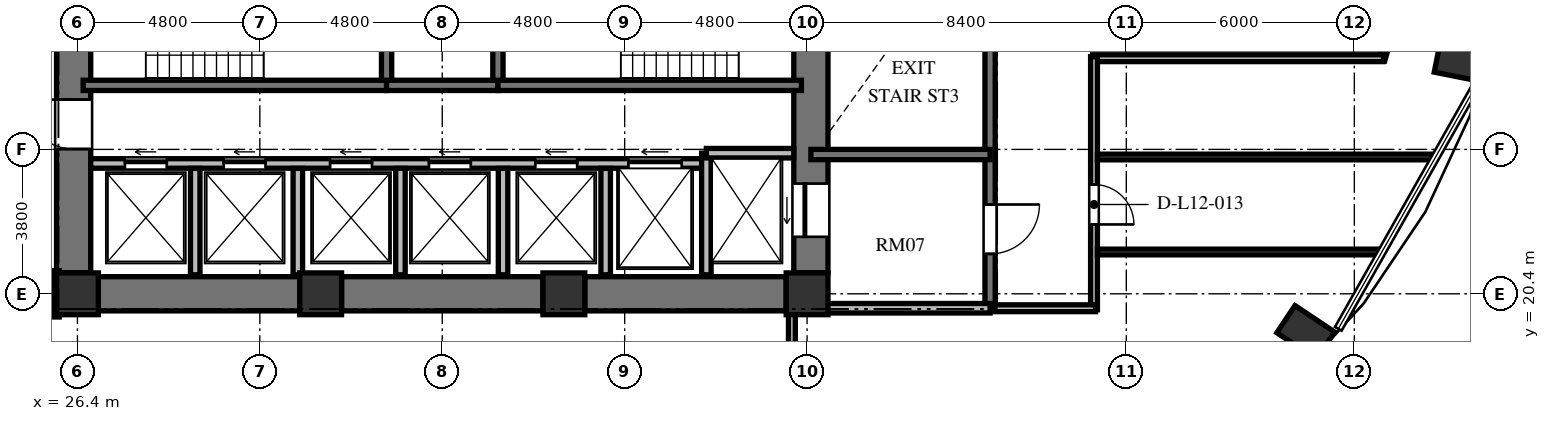
"""IFC4 building model, lengths in metres.
Left out: names, types, materials, properties, quantities, classifications, styles, units other than length and angle.
Written with IfcOpenShell. Run it as: python <this file> out.ifc"""

import sys

from ifc_helpers import new_model, si_unit, direction, frame, frame_2d, origin, origin_2d, place, context, subcontext, project, spatial, rectangle, extrude, element, fill, save


model = new_model("IFC4")
c1 = context("Model", 3, precision=1e-05, world=origin(), true_north=direction((0.0, 1.0)))
c2 = subcontext(c1, "Body", "Model", "MODEL_VIEW")
j1 = project(units=[si_unit("LENGTHUNIT", "METRE"), si_unit("PLANEANGLEUNIT", "RADIAN")], contexts=[c1])
p1 = place(None, origin())
s1 = spatial("IfcSite", under=j1, at=p1, CompositionType="ELEMENT")
p2 = place(p1, origin())
s2 = spatial("IfcBuilding", under=s1, at=p2, CompositionType="ELEMENT")
p3 = place(p2, frame((0.0, 0.0, 50.736)))
s3 = spatial("IfcBuildingStorey", under=s2, at=p3, CompositionType="ELEMENT", Elevation=50.736)
for number, where, z_axis, x_axis in (
    (1, (58.72, 19.386, 0.0), (0.0, 0.0, 1.0), (0.831, -0.556, 0.0)),
    (2, (62.8, 26.532, 0.0), (0.0, 0.0, 1.0), (0.981, -0.195, 0.0)),
):
    element("IfcColumn", number, at=place(p3, frame(where, z_axis=z_axis, x_axis=x_axis)), inside=s3, PredefinedType="COLUMN", context=c2, shape_type="SweptSolid", body=[
        extrude(rectangle(XDim=1.25, YDim=0.86, at=origin_2d()), origin(), (0.0, 0.0, 1.0), 3.648),
    ])
for number, where, z_axis, x_axis in (
    (3, (26.4, 20.4, 0.0), (0.0, 0.0, 1.0), (1.0, 0.0, 0.0)),
    (4, (32.8, 20.4, 0.0), (0.0, 0.0, 1.0), (1.0, 0.0, 0.0)),
    (5, (39.2, 20.4, 0.0), (0.0, 0.0, 1.0), (1.0, 0.0, 0.0)),
    (6, (45.6, 20.4, 0.0), (0.0, 0.0, 1.0), (1.0, 0.0, 0.0)),
):
    element("IfcColumn", number, at=place(p3, frame(where, z_axis=z_axis, x_axis=x_axis)), inside=s3, PredefinedType="COLUMN", context=c2, shape_type="SweptSolid", body=[
        extrude(rectangle(XDim=1.1, YDim=1.1, at=origin_2d()), origin(), (0.0, 0.0, 1.0), 3.648),
    ])
p4 = place(p3, frame((26.3, 20.95, 0.0), z_axis=(0.0, 0.0, 1.0), x_axis=(0.0, 1.0, 0.0)))
e7 = element("IfcWall", 7, at=p4, inside=s3, PredefinedType="SHEAR", context=c2, shape_type="SweptSolid", body=[
    extrude(rectangle(XDim=14.1, YDim=0.9, at=frame_2d((7.05, 0.0))), origin(), (0.0, 0.0, 1.0), 3.648),
])
p5 = place(p4, frame((6.5, 0.0, 0.0)))
e8 = element("IfcOpeningElement", 8, at=p5, cuts=e7, PredefinedType="OPENING", context=c2, shape_type="SweptSolid", body=[
    extrude(rectangle(XDim=1.2, YDim=2.15, at=frame_2d((0.6, 1.075))), frame((0.0, 0.46, 0.0), z_axis=(0.0, -1.0, 0.0), x_axis=(1.0, 0.0, 0.0)), (0.0, 0.0, 1.0), 0.92),
])
p6 = place(p4, frame((9.6, 0.0, 0.0)))
e9 = element("IfcOpeningElement", 9, at=p6, cuts=e7, PredefinedType="OPENING", context=c2, shape_type="SweptSolid", body=[
    extrude(rectangle(XDim=1.3, YDim=2.2, at=frame_2d((0.65, 1.1))), frame((0.0, 0.46, 0.0), z_axis=(0.0, -1.0, 0.0), x_axis=(1.0, 0.0, 0.0)), (0.0, 0.0, 1.0), 0.92),
])
p7 = place(p4, frame((3.26, 0.0, 0.0)))
e10 = element("IfcOpeningElement", 10, at=p7, cuts=e7, PredefinedType="OPENING", context=c2, shape_type="SweptSolid", body=[
    extrude(rectangle(XDim=1.3, YDim=2.2, at=frame_2d((0.65, 1.1))), frame((0.0, 0.46, 0.0), z_axis=(0.0, -1.0, 0.0), x_axis=(1.0, 0.0, 0.0)), (0.0, 0.0, 1.0), 0.92),
])
p8 = place(p3, frame((45.7, 20.95, 0.0), z_axis=(0.0, 0.0, 1.0), x_axis=(0.0, 1.0, 0.0)))
e11 = element("IfcWall", 11, at=p8, inside=s3, PredefinedType="SHEAR", context=c2, shape_type="SweptSolid", body=[
    extrude(rectangle(XDim=14.1, YDim=0.9, at=frame_2d((7.05, 0.0))), origin(), (0.0, 0.0, 1.0), 3.648),
])
p9 = place(p8, frame((11.75, 0.0, 0.0)))
e12 = element("IfcOpeningElement", 12, at=p9, cuts=e11, PredefinedType="OPENING", context=c2, shape_type="SweptSolid", body=[
    extrude(rectangle(XDim=1.4, YDim=2.3, at=frame_2d((0.7, 1.15))), frame((0.0, 0.46, 0.0), z_axis=(0.0, -1.0, 0.0), x_axis=(1.0, 0.0, 0.0)), (0.0, 0.0, 1.0), 0.92),
])
p10 = place(p8, frame((0.95, 0.0, 0.0)))
e13 = element("IfcOpeningElement", 13, at=p10, cuts=e11, PredefinedType="OPENING", context=c2, shape_type="SweptSolid", body=[
    extrude(rectangle(XDim=1.4, YDim=2.3, at=frame_2d((0.7, 1.15))), frame((0.0, 0.46, 0.0), z_axis=(0.0, -1.0, 0.0), x_axis=(1.0, 0.0, 0.0)), (0.0, 0.0, 1.0), 0.92),
])
p11 = place(p3, frame((26.95, 20.4, 0.0), z_axis=(0.0, 0.0, 1.0), x_axis=(1.0, 0.0, 0.0)))
e14 = element("IfcWall", 14, at=p11, inside=s3, PredefinedType="SHEAR", context=c2, shape_type="SweptSolid", body=[
    extrude(rectangle(XDim=5.3, YDim=0.9, at=frame_2d((2.65, 0.0))), origin(), (0.0, 0.0, 1.0), 3.648),
])
p12 = place(p3, frame((33.35, 20.4, 0.0), z_axis=(0.0, 0.0, 1.0), x_axis=(1.0, 0.0, 0.0)))
e15 = element("IfcWall", 15, at=p12, inside=s3, PredefinedType="SHEAR", context=c2, shape_type="SweptSolid", body=[
    extrude(rectangle(XDim=5.3, YDim=0.9, at=frame_2d((2.65, 0.0))), origin(), (0.0, 0.0, 1.0), 3.648),
])
p13 = place(p3, frame((39.75, 20.4, 0.0), z_axis=(0.0, 0.0, 1.0), x_axis=(1.0, 0.0, 0.0)))
e16 = element("IfcWall", 16, at=p13, inside=s3, PredefinedType="SHEAR", context=c2, shape_type="SweptSolid", body=[
    extrude(rectangle(XDim=5.3, YDim=0.9, at=frame_2d((2.65, 0.0))), origin(), (0.0, 0.0, 1.0), 3.648),
])
p14 = place(p3, frame((26.55, 25.885, 0.0), z_axis=(0.0, 0.0, 1.0), x_axis=(1.0, 0.0, 0.0)))
e17 = element("IfcWall", 17, at=p14, inside=s3, PredefinedType="SHEAR", context=c2, shape_type="SweptSolid", body=[
    extrude(rectangle(XDim=7.985, YDim=0.27, at=frame_2d((3.992, 0.0))), origin(), (0.0, 0.0, 1.0), 3.648),
])
p15 = place(p3, frame((34.535, 25.885, 0.0), z_axis=(0.0, 0.0, 1.0), x_axis=(1.0, 0.0, 0.0)))
e18 = element("IfcWall", 18, at=p15, inside=s3, PredefinedType="SHEAR", context=c2, shape_type="SweptSolid", body=[
    extrude(rectangle(XDim=2.93, YDim=0.27, at=frame_2d((1.465, 0.0))), origin(), (0.0, 0.0, 1.0), 3.648),
])
p16 = place(p3, frame((37.465, 25.885, 0.0), z_axis=(0.0, 0.0, 1.0), x_axis=(1.0, 0.0, 0.0)))
e19 = element("IfcWall", 19, at=p16, inside=s3, PredefinedType="SHEAR", context=c2, shape_type="SweptSolid", body=[
    extrude(rectangle(XDim=7.985, YDim=0.27, at=frame_2d((3.992, 0.0))), origin(), (0.0, 0.0, 1.0), 3.648),
])
for number, where, z_axis, x_axis in (
    (20, (34.535, 26.02, 0.0), (0.0, 0.0, 1.0), (0.0, 1.0, 0.0)),
    (21, (37.465, 26.02, 0.0), (0.0, 0.0, 1.0), (0.0, 1.0, 0.0)),
):
    element("IfcWall", number, at=place(p3, frame(where, z_axis=z_axis, x_axis=x_axis)), inside=s3, PredefinedType="SHEAR", context=c2, shape_type="SweptSolid", body=[
        extrude(rectangle(XDim=4.08, YDim=0.27, at=frame_2d((2.04, 0.0))), origin(), (0.0, 0.0, 1.0), 3.648),
    ])
p17 = place(p3, frame((26.75, 23.83, 0.0), z_axis=(0.0, 0.0, 1.0), x_axis=(1.0, 0.0, 0.0)))
e22 = element("IfcWall", 22, at=p17, inside=s3, PredefinedType="SOLIDWALL", context=c2, shape_type="SweptSolid", body=[
    extrude(rectangle(XDim=16.2, YDim=0.25, at=frame_2d((8.1, 0.0))), origin(), (0.0, 0.0, 1.0), 3.428),
])
p18 = place(p17, frame((0.9, 0.0, 0.0)))
e23 = element("IfcOpeningElement", 23, at=p18, cuts=e22, PredefinedType="OPENING", context=c2, shape_type="SweptSolid", body=[
    extrude(rectangle(XDim=1.1, YDim=2.2, at=frame_2d((0.55, 1.1))), frame((0.0, 0.135, 0.0), z_axis=(0.0, -1.0, 0.0), x_axis=(1.0, 0.0, 0.0)), (0.0, 0.0, 1.0), 0.27),
])
p19 = place(p17, frame((3.5, 0.0, 0.0)))
e24 = element("IfcOpeningElement", 24, at=p19, cuts=e22, PredefinedType="OPENING", context=c2, shape_type="SweptSolid", body=[
    extrude(rectangle(XDim=1.1, YDim=2.2, at=frame_2d((0.55, 1.1))), frame((0.0, 0.135, 0.0), z_axis=(0.0, -1.0, 0.0), x_axis=(1.0, 0.0, 0.0)), (0.0, 0.0, 1.0), 0.27),
])
p20 = place(p17, frame((6.3, 0.0, 0.0)))
e25 = element("IfcOpeningElement", 25, at=p20, cuts=e22, PredefinedType="OPENING", context=c2, shape_type="SweptSolid", body=[
    extrude(rectangle(XDim=1.1, YDim=2.2, at=frame_2d((0.55, 1.1))), frame((0.0, 0.135, 0.0), z_axis=(0.0, -1.0, 0.0), x_axis=(1.0, 0.0, 0.0)), (0.0, 0.0, 1.0), 0.27),
])
p21 = place(p17, frame((8.9, 0.0, 0.0)))
e26 = element("IfcOpeningElement", 26, at=p21, cuts=e22, PredefinedType="OPENING", context=c2, shape_type="SweptSolid", body=[
    extrude(rectangle(XDim=1.1, YDim=2.2, at=frame_2d((0.55, 1.1))), frame((0.0, 0.135, 0.0), z_axis=(0.0, -1.0, 0.0), x_axis=(1.0, 0.0, 0.0)), (0.0, 0.0, 1.0), 0.27),
])
p22 = place(p17, frame((11.7, 0.0, 0.0)))
e27 = element("IfcOpeningElement", 27, at=p22, cuts=e22, PredefinedType="OPENING", context=c2, shape_type="SweptSolid", body=[
    extrude(rectangle(XDim=1.1, YDim=2.2, at=frame_2d((0.55, 1.1))), frame((0.0, 0.135, 0.0), z_axis=(0.0, -1.0, 0.0), x_axis=(1.0, 0.0, 0.0)), (0.0, 0.0, 1.0), 0.27),
])
p23 = place(p17, frame((14.15, 0.0, 0.0)))
e28 = element("IfcOpeningElement", 28, at=p23, cuts=e22, PredefinedType="OPENING", context=c2, shape_type="SweptSolid", body=[
    extrude(rectangle(XDim=1.4, YDim=2.3, at=frame_2d((0.7, 1.15))), frame((0.0, 0.135, 0.0), z_axis=(0.0, -1.0, 0.0), x_axis=(1.0, 0.0, 0.0)), (0.0, 0.0, 1.0), 0.27),
])
p24 = place(p3, frame((42.95, 20.9, 0.0), z_axis=(0.0, 0.0, 1.0), x_axis=(0.0, 1.0, 0.0)))
e29 = element("IfcWall", 29, at=p24, inside=s3, PredefinedType="SOLIDWALL", context=c2, shape_type="SweptSolid", body=[
    extrude(rectangle(XDim=3.2, YDim=0.25, at=frame_2d((1.6, 0.0))), origin(), (0.0, 0.0, 1.0), 3.428),
])
p25 = place(p3, frame((42.95, 24.1, 0.0), z_axis=(0.0, 0.0, 1.0), x_axis=(1.0, 0.0, 0.0)))
e30 = element("IfcWall", 30, at=p25, inside=s3, PredefinedType="SOLIDWALL", context=c2, shape_type="SweptSolid", body=[
    extrude(rectangle(XDim=2.3, YDim=0.25, at=frame_2d((1.15, 0.0))), origin(), (0.0, 0.0, 1.0), 3.428),
])
for number, where, z_axis, x_axis in (
    (31, (29.5, 20.9, 0.0), (0.0, 0.0, 1.0), (0.0, 1.0, 0.0)),
    (32, (32.2, 20.9, 0.0), (0.0, 0.0, 1.0), (0.0, 1.0, 0.0)),
    (33, (34.9, 20.9, 0.0), (0.0, 0.0, 1.0), (0.0, 1.0, 0.0)),
    (34, (37.6, 20.9, 0.0), (0.0, 0.0, 1.0), (0.0, 1.0, 0.0)),
    (35, (40.3, 20.9, 0.0), (0.0, 0.0, 1.0), (0.0, 1.0, 0.0)),
):
    element("IfcWall", number, at=place(p3, frame(where, z_axis=z_axis, x_axis=x_axis)), inside=s3, PredefinedType="SOLIDWALL", context=c2, shape_type="SweptSolid", body=[
        extrude(rectangle(XDim=2.8, YDim=0.25, at=frame_2d((1.4, 0.0))), origin(), (0.0, 0.0, 1.0), 3.428),
    ])
p26 = place(p3, frame((50.415, 35.845, 0.0), z_axis=(0.0, 0.0, 1.0), x_axis=(0.0, -1.0, 0.0)))
e36 = element("IfcWall", 36, at=p26, inside=s3, PredefinedType="SHEAR", context=c2, shape_type="SweptSolid", body=[
    extrude(rectangle(XDim=15.825, YDim=0.27, at=frame_2d((7.913, 0.0))), origin(), (0.0, 0.0, 1.0), 3.648),
])
p27 = place(p26, frame((4.445, 0.0, 0.0)))
e37 = element("IfcOpeningElement", 37, at=p27, cuts=e36, PredefinedType="OPENING", context=c2, shape_type="SweptSolid", body=[
    extrude(rectangle(XDim=1.2, YDim=2.15, at=frame_2d((0.6, 1.075))), frame((0.0, 0.145, 0.0), z_axis=(0.0, -1.0, 0.0), x_axis=(1.0, 0.0, 0.0)), (0.0, 0.0, 1.0), 0.29),
])
p28 = place(p26, frame((1.295, 0.0, 0.0)))
e38 = element("IfcOpeningElement", 38, at=p28, cuts=e36, PredefinedType="OPENING", context=c2, shape_type="SweptSolid", body=[
    extrude(rectangle(XDim=1.3, YDim=2.2, at=frame_2d((0.65, 1.1))), frame((0.0, 0.145, 0.0), z_axis=(0.0, -1.0, 0.0), x_axis=(1.0, 0.0, 0.0)), (0.0, 0.0, 1.0), 0.29),
])
p29 = place(p26, frame((13.095, 0.0, 0.0)))
e39 = element("IfcOpeningElement", 39, at=p29, cuts=e36, PredefinedType="OPENING", context=c2, shape_type="SweptSolid", body=[
    extrude(rectangle(XDim=1.3, YDim=2.2, at=frame_2d((0.65, 1.1))), frame((0.0, 0.145, 0.0), z_axis=(0.0, -1.0, 0.0), x_axis=(1.0, 0.0, 0.0)), (0.0, 0.0, 1.0), 0.29),
])
p30 = place(p3, frame((45.7, 24.065, 0.0), z_axis=(0.0, 0.0, 1.0), x_axis=(1.0, 0.0, 0.0)))
e40 = element("IfcWall", 40, at=p30, inside=s3, PredefinedType="SHEAR", context=c2, shape_type="SweptSolid", body=[
    extrude(rectangle(XDim=4.715, YDim=0.27, at=frame_2d((2.357, 0.0))), origin(), (0.0, 0.0, 1.0), 3.648),
])
p31 = place(p3, frame((45.7, 20.02, 0.0), z_axis=(0.0, 0.0, 1.0), x_axis=(1.0, 0.0, 0.0)))
e41 = element("IfcWall", 41, at=p31, inside=s3, PredefinedType="SOLIDWALL", context=c2, shape_type="SweptSolid", body=[
    extrude(rectangle(XDim=4.715, YDim=0.25, at=frame_2d((2.357, 0.0))), origin(), (0.0, 0.0, 1.0), 2.813),
])
p32 = place(p3, frame((61.154, 28.107, 0.0), z_axis=(0.0, 0.0, 1.0), x_axis=(-0.271748942561, -0.962368179138, 0.0)))
e42 = element("IfcWall", 42, at=p32, inside=s3, PredefinedType="PARTITIONING", context=c2, shape_type="SweptSolid", body=[
    extrude(rectangle(XDim=1.606, YDim=0.18, at=frame_2d((0.803, 0.0))), origin(), (0.0, 0.0, 1.0), 3.428),
])
p33 = place(p3, frame((60.768, 26.6, 0.0), z_axis=(0.0, 0.0, 1.0), x_axis=(-1.0, 0.0, 0.0)))
e43 = element("IfcWall", 43, at=p33, inside=s3, PredefinedType="PARTITIONING", context=c2, shape_type="SweptSolid", body=[
    extrude(rectangle(XDim=7.658, YDim=0.18, at=frame_2d((3.829, 0.0))), origin(), (0.0, 0.0, 1.0), 3.428),
])
p34 = place(p3, frame((53.15, 26.64, 0.0), z_axis=(0.0, 0.0, 1.0), x_axis=(0.0, -1.0, 0.0)))
e44 = element("IfcWall", 44, at=p34, inside=s3, PredefinedType="PARTITIONING", context=c2, shape_type="SweptSolid", body=[
    extrude(rectangle(XDim=6.66, YDim=0.18, at=frame_2d((3.33, 0.0))), origin(), (0.0, 0.0, 1.0), 3.428),
])
p35 = place(p34, frame((3.365, 0.0, 0.0)))
e45 = element("IfcOpeningElement", 45, at=p35, cuts=e44, PredefinedType="OPENING", context=c2, shape_type="SweptSolid", body=[
    extrude(rectangle(XDim=1.05, YDim=2.15, at=frame_2d((0.525, 1.075))), frame((0.0, 0.1, 0.0), z_axis=(0.0, -1.0, 0.0), x_axis=(1.0, 0.0, 0.0)), (0.0, 0.0, 1.0), 0.2),
])
p36 = place(p3, frame((53.19, 20.02, 0.0), z_axis=(0.0, 0.0, 1.0), x_axis=(-1.0, 0.0, 0.0)))
e46 = element("IfcWall", 46, at=p36, inside=s3, PredefinedType="PARTITIONING", context=c2, shape_type="SweptSolid", body=[
    extrude(rectangle(XDim=2.65, YDim=0.18, at=frame_2d((1.325, 0.0))), origin(), (0.0, 0.0, 1.0), 2.813),
])
p37 = place(p3, frame((25.83, 21.01, 0.0), z_axis=(0.0, 0.0, 1.0), x_axis=(0.0, -1.0, 0.0)))
e47 = element("IfcWall", 47, at=p37, inside=s3, PredefinedType="PARTITIONING", context=c2, shape_type="SweptSolid", body=[
    extrude(rectangle(XDim=1.22, YDim=0.18, at=frame_2d((0.61, 0.0))), origin(), (0.0, 0.0, 1.0), 3.428),
])
p38 = place(p3, frame((45.2, 19.91, 0.0), z_axis=(0.0, 0.0, 1.0), x_axis=(0.0, -1.0, 0.0)))
e48 = element("IfcWall", 48, at=p38, inside=s3, PredefinedType="PARTITIONING", context=c2, shape_type="SweptSolid", body=[
    extrude(rectangle(XDim=2.55, YDim=0.18, at=frame_2d((1.275, 0.0))), origin(), (0.0, 0.0, 1.0), 3.428),
])
p39 = place(p3, frame((53.24, 21.5, 0.0), z_axis=(0.0, 0.0, 1.0), x_axis=(1.0, 0.0, 0.0)))
e49 = element("IfcWall", 49, at=p39, inside=s3, PredefinedType="PARTITIONING", context=c2, shape_type="SweptSolid", body=[
    extrude(rectangle(XDim=7.479, YDim=0.15, at=frame_2d((3.74, 0.0))), origin(), (0.0, 0.0, 1.0), 3.428),
])
p40 = place(p3, frame((53.24, 24.0, 0.0), z_axis=(0.0, 0.0, 1.0), x_axis=(1.0, 0.0, 0.0)))
e50 = element("IfcWall", 50, at=p40, inside=s3, PredefinedType="PARTITIONING", context=c2, shape_type="SweptSolid", body=[
    extrude(rectangle(XDim=8.895, YDim=0.15, at=frame_2d((4.448, 0.0))), origin(), (0.0, 0.0, 1.0), 3.428),
])
p41 = place(p7, origin())
e51 = element("IfcDoor", 51, at=p41, inside=s3, OperationType="SINGLE_SWING_RIGHT", PredefinedType="DOOR", context=c2, shape_type="SweptSolid", body=[
    extrude(rectangle(XDim=1.3, YDim=2.2, at=frame_2d((0.65, 1.1))), frame((0.0, 0.025, 0.0), z_axis=(0.0, -1.0, 0.0), x_axis=(1.0, 0.0, 0.0)), (0.0, 0.0, 1.0), 0.05),
])
fill(e10, e51)
p42 = place(p18, origin())
e52 = element("IfcDoor", 52, at=p42, inside=s3, OperationType="SLIDING_TO_LEFT", PredefinedType="DOOR", context=c2, shape_type="SweptSolid", body=[
    extrude(rectangle(XDim=1.1, YDim=2.2, at=frame_2d((0.55, 1.1))), frame((0.0, 0.025, 0.0), z_axis=(0.0, -1.0, 0.0), x_axis=(1.0, 0.0, 0.0)), (0.0, 0.0, 1.0), 0.05),
])
fill(e23, e52)
p43 = place(p19, origin())
e53 = element("IfcDoor", 53, at=p43, inside=s3, OperationType="SLIDING_TO_LEFT", PredefinedType="DOOR", context=c2, shape_type="SweptSolid", body=[
    extrude(rectangle(XDim=1.1, YDim=2.2, at=frame_2d((0.55, 1.1))), frame((0.0, 0.025, 0.0), z_axis=(0.0, -1.0, 0.0), x_axis=(1.0, 0.0, 0.0)), (0.0, 0.0, 1.0), 0.05),
])
fill(e24, e53)
p44 = place(p20, origin())
e54 = element("IfcDoor", 54, at=p44, inside=s3, OperationType="SLIDING_TO_LEFT", PredefinedType="DOOR", context=c2, shape_type="SweptSolid", body=[
    extrude(rectangle(XDim=1.1, YDim=2.2, at=frame_2d((0.55, 1.1))), frame((0.0, 0.025, 0.0), z_axis=(0.0, -1.0, 0.0), x_axis=(1.0, 0.0, 0.0)), (0.0, 0.0, 1.0), 0.05),
])
fill(e25, e54)
p45 = place(p21, origin())
e55 = element("IfcDoor", 55, at=p45, inside=s3, OperationType="SLIDING_TO_LEFT", PredefinedType="DOOR", context=c2, shape_type="SweptSolid", body=[
    extrude(rectangle(XDim=1.1, YDim=2.2, at=frame_2d((0.55, 1.1))), frame((0.0, 0.025, 0.0), z_axis=(0.0, -1.0, 0.0), x_axis=(1.0, 0.0, 0.0)), (0.0, 0.0, 1.0), 0.05),
])
fill(e26, e55)
p46 = place(p22, origin())
e56 = element("IfcDoor", 56, at=p46, inside=s3, OperationType="SLIDING_TO_LEFT", PredefinedType="DOOR", context=c2, shape_type="SweptSolid", body=[
    extrude(rectangle(XDim=1.1, YDim=2.2, at=frame_2d((0.55, 1.1))), frame((0.0, 0.025, 0.0), z_axis=(0.0, -1.0, 0.0), x_axis=(1.0, 0.0, 0.0)), (0.0, 0.0, 1.0), 0.05),
])
fill(e27, e56)
p47 = place(p10, origin())
e57 = element("IfcDoor", 57, at=p47, inside=s3, OperationType="SLIDING_TO_LEFT", PredefinedType="DOOR", context=c2, shape_type="SweptSolid", body=[
    extrude(rectangle(XDim=1.4, YDim=2.3, at=frame_2d((0.7, 1.15))), frame((0.0, 0.025, 0.0), z_axis=(0.0, -1.0, 0.0), x_axis=(1.0, 0.0, 0.0)), (0.0, 0.0, 1.0), 0.05),
])
fill(e13, e57)
p48 = place(p23, origin())
e58 = element("IfcDoor", 58, at=p48, inside=s3, OperationType="SLIDING_TO_LEFT", PredefinedType="DOOR", context=c2, shape_type="SweptSolid", body=[
    extrude(rectangle(XDim=1.4, YDim=2.3, at=frame_2d((0.7, 1.15))), frame((0.0, 0.025, 0.0), z_axis=(0.0, -1.0, 0.0), x_axis=(1.0, 0.0, 0.0)), (0.0, 0.0, 1.0), 0.05),
])
fill(e28, e58)
p49 = place(p29, origin())
e59 = element("IfcDoor", 59, at=p49, inside=s3, OperationType="SINGLE_SWING_LEFT", PredefinedType="DOOR", context=c2, shape_type="SweptSolid", body=[
    extrude(rectangle(XDim=1.3, YDim=2.2, at=frame_2d((0.65, 1.1))), frame((0.0, 0.025, 0.0), z_axis=(0.0, -1.0, 0.0), x_axis=(1.0, 0.0, 0.0)), (0.0, 0.0, 1.0), 0.05),
])
fill(e39, e59)
p50 = place(p35, origin())
e60 = element("IfcDoor", 60, at=p50, inside=s3, OperationType="SINGLE_SWING_RIGHT", PredefinedType="DOOR", context=c2, shape_type="SweptSolid", body=[
    extrude(rectangle(XDim=1.05, YDim=2.15, at=frame_2d((0.525, 1.075))), frame((0.0, 0.025, 0.0), z_axis=(0.0, -1.0, 0.0), x_axis=(1.0, 0.0, 0.0)), (0.0, 0.0, 1.0), 0.05),
])
fill(e45, e60)
save(model, sys.argv[1])
